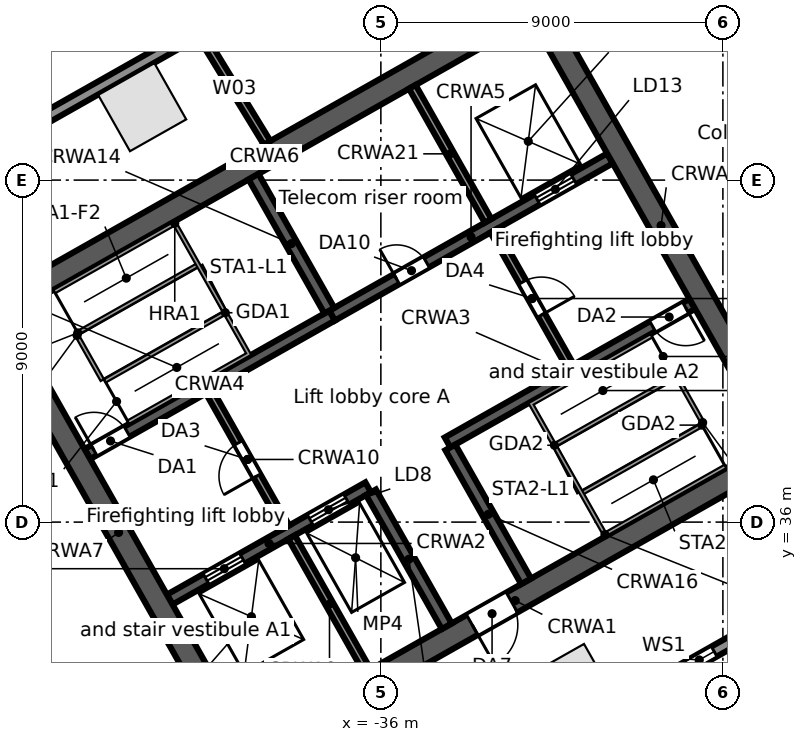
"""IFC4 building model, lengths in metres.
Left out: names, types, materials, properties, quantities, classifications, styles, units other than length and angle.
Written with IfcOpenShell. Run it as: python <this file> out.ifc"""

import sys

from ifc_helpers import new_model, si_unit, direction, frame, frame_2d, origin, origin_2d, place, context, subcontext, project, spatial, rectangle, extrude, element, fill, save


model = new_model("IFC4")
c1 = context("Model", 3, precision=1e-05, world=origin(), true_north=direction((0.0, 1.0)))
c2 = subcontext(c1, "Body", "Model", "MODEL_VIEW")
j1 = project(units=[si_unit("LENGTHUNIT", "METRE"), si_unit("PLANEANGLEUNIT", "RADIAN")], contexts=[c1])
p1 = place(None, origin())
s1 = spatial("IfcSite", under=j1, at=p1, CompositionType="ELEMENT")
p2 = place(p1, origin())
s2 = spatial("IfcBuilding", under=s1, at=p2, CompositionType="ELEMENT")
p3 = place(p2, frame((0.0, 0.0, 66.5)))
s3 = spatial("IfcBuildingStorey", under=s2, at=p3, CompositionType="ELEMENT", Elevation=66.5)
for number, where, z_axis, x_axis in (
    (1, (-42.28, 46.919, 0.0), (0.0, 0.0, 1.0), (-0.87, -0.492, 0.0)),
    (2, (-30.976, 31.635, 0.0), (0.0, 0.0, 1.0), (0.87, 0.492, 0.0)),
):
    element("IfcColumn", number, at=place(p3, frame(where, z_axis=z_axis, x_axis=x_axis)), inside=s3, PredefinedType="COLUMN", context=c2, shape_type="SweptSolid", body=[
        extrude(rectangle(XDim=1.7, YDim=1.7, at=origin_2d()), origin(), (0.0, 0.0, 1.0), 5.0),
    ])
p4 = place(p3, frame((-58.745, 38.764, 0.0), z_axis=(0.0, 0.0, 1.0), x_axis=(0.870355811726, 0.492423355453, 0.0)))
e3 = element("IfcWall", 3, at=p4, inside=s3, PredefinedType="STANDARD", context=c2, shape_type="SweptSolid", body=[
    extrude(rectangle(XDim=64.025, YDim=0.3, at=frame_2d((32.013, 0.0))), origin(), (0.0, 0.0, 1.0), 4.68),
])
p5 = place(p4, frame((60.122, 0.0, 0.6)))
e4 = element("IfcOpeningElement", 4, at=p5, cuts=e3, PredefinedType="OPENING", context=c2, shape_type="SweptSolid", body=[
    extrude(rectangle(XDim=0.9, YDim=3.2, at=frame_2d((0.45, 1.6))), frame((0.0, 0.16, 0.0), z_axis=(0.0, -1.0, 0.0), x_axis=(1.0, 0.0, 0.0)), (0.0, 0.0, 1.0), 0.32),
])
p6 = place(p4, frame((50.992, 0.0, 0.6)))
e5 = element("IfcOpeningElement", 5, at=p6, cuts=e3, PredefinedType="OPENING", context=c2, shape_type="SweptSolid", body=[
    extrude(rectangle(XDim=0.9, YDim=3.2, at=frame_2d((0.45, 1.6))), frame((0.0, 0.16, 0.0), z_axis=(0.0, -1.0, 0.0), x_axis=(1.0, 0.0, 0.0)), (0.0, 0.0, 1.0), 0.32),
])
p7 = place(p4, frame((41.862, 0.0, 0.6)))
e6 = element("IfcOpeningElement", 6, at=p7, cuts=e3, PredefinedType="OPENING", context=c2, shape_type="SweptSolid", body=[
    extrude(rectangle(XDim=0.9, YDim=3.2, at=frame_2d((0.45, 1.6))), frame((0.0, 0.16, 0.0), z_axis=(0.0, -1.0, 0.0), x_axis=(1.0, 0.0, 0.0)), (0.0, 0.0, 1.0), 0.32),
])
p8 = place(p4, frame((32.732, 0.0, 0.6)))
e7 = element("IfcOpeningElement", 7, at=p8, cuts=e3, PredefinedType="OPENING", context=c2, shape_type="SweptSolid", body=[
    extrude(rectangle(XDim=0.9, YDim=3.2, at=frame_2d((0.45, 1.6))), frame((0.0, 0.16, 0.0), z_axis=(0.0, -1.0, 0.0), x_axis=(1.0, 0.0, 0.0)), (0.0, 0.0, 1.0), 0.32),
])
p9 = place(p4, frame((23.602, 0.0, 0.6)))
e8 = element("IfcOpeningElement", 8, at=p9, cuts=e3, PredefinedType="OPENING", context=c2, shape_type="SweptSolid", body=[
    extrude(rectangle(XDim=0.9, YDim=3.2, at=frame_2d((0.45, 1.6))), frame((0.0, 0.16, 0.0), z_axis=(0.0, -1.0, 0.0), x_axis=(1.0, 0.0, 0.0)), (0.0, 0.0, 1.0), 0.32),
])
p10 = place(p4, frame((14.472, 0.0, 0.6)))
e9 = element("IfcOpeningElement", 9, at=p10, cuts=e3, PredefinedType="OPENING", context=c2, shape_type="SweptSolid", body=[
    extrude(rectangle(XDim=0.9, YDim=3.2, at=frame_2d((0.45, 1.6))), frame((0.0, 0.16, 0.0), z_axis=(0.0, -1.0, 0.0), x_axis=(1.0, 0.0, 0.0)), (0.0, 0.0, 1.0), 0.32),
])
p11 = place(p4, frame((5.342, 0.0, 0.6)))
e10 = element("IfcOpeningElement", 10, at=p11, cuts=e3, PredefinedType="OPENING", context=c2, shape_type="SweptSolid", body=[
    extrude(rectangle(XDim=0.9, YDim=3.2, at=frame_2d((0.45, 1.6))), frame((0.0, 0.16, 0.0), z_axis=(0.0, -1.0, 0.0), x_axis=(1.0, 0.0, 0.0)), (0.0, 0.0, 1.0), 0.32),
])
p12 = place(p3, frame((-44.109, 26.504, 0.0), z_axis=(0.0, 0.0, 1.0), x_axis=(-0.857169502585, 0.515034410344, 0.0)))
e11 = element("IfcWall", 11, at=p12, inside=s3, PredefinedType="STANDARD", context=c2, shape_type="SweptSolid", body=[
    extrude(rectangle(XDim=17.127, YDim=0.3, at=frame_2d((8.563, 0.0))), origin(), (0.0, 0.0, 1.0), 4.68),
])
p13 = place(p12, frame((13.403, 0.0, 0.6)))
e12 = element("IfcOpeningElement", 12, at=p13, cuts=e11, PredefinedType="OPENING", context=c2, shape_type="SweptSolid", body=[
    extrude(rectangle(XDim=0.9, YDim=3.2, at=frame_2d((0.45, 1.6))), frame((0.0, 0.16, 0.0), z_axis=(0.0, -1.0, 0.0), x_axis=(1.0, 0.0, 0.0)), (0.0, 0.0, 1.0), 0.32),
])
p14 = place(p12, frame((4.903, 0.0, 0.6)))
e13 = element("IfcOpeningElement", 13, at=p14, cuts=e11, PredefinedType="OPENING", context=c2, shape_type="SweptSolid", body=[
    extrude(rectangle(XDim=0.9, YDim=3.2, at=frame_2d((0.45, 1.6))), frame((0.0, 0.16, 0.0), z_axis=(0.0, -1.0, 0.0), x_axis=(1.0, 0.0, 0.0)), (0.0, 0.0, 1.0), 0.32),
])
p15 = place(p3, frame((-0.055, 47.969, 0.0), z_axis=(0.0, 0.0, 1.0), x_axis=(-0.870355730478, -0.492423499058, 0.0)))
e14 = element("IfcWall", 14, at=p15, inside=s3, PredefinedType="STANDARD", context=c2, shape_type="SweptSolid", body=[
    extrude(rectangle(XDim=43.75, YDim=0.3, at=frame_2d((21.875, 0.0))), origin(), (0.0, 0.0, 1.0), 4.68),
])
p16 = place(p15, frame((39.977, 0.0, 0.6)))
e15 = element("IfcOpeningElement", 15, at=p16, cuts=e14, PredefinedType="OPENING", context=c2, shape_type="SweptSolid", body=[
    extrude(rectangle(XDim=0.9, YDim=3.2, at=frame_2d((0.45, 1.6))), frame((0.0, 0.16, 0.0), z_axis=(0.0, -1.0, 0.0), x_axis=(1.0, 0.0, 0.0)), (0.0, 0.0, 1.0), 0.32),
])
p17 = place(p15, frame((31.222, 0.0, 0.6)))
e16 = element("IfcOpeningElement", 16, at=p17, cuts=e14, PredefinedType="OPENING", context=c2, shape_type="SweptSolid", body=[
    extrude(rectangle(XDim=0.9, YDim=3.2, at=frame_2d((0.45, 1.6))), frame((0.0, 0.16, 0.0), z_axis=(0.0, -1.0, 0.0), x_axis=(1.0, 0.0, 0.0)), (0.0, 0.0, 1.0), 0.32),
])
p18 = place(p15, frame((22.468, 0.0, 0.6)))
e17 = element("IfcOpeningElement", 17, at=p18, cuts=e14, PredefinedType="OPENING", context=c2, shape_type="SweptSolid", body=[
    extrude(rectangle(XDim=0.9, YDim=3.2, at=frame_2d((0.45, 1.6))), frame((0.0, 0.16, 0.0), z_axis=(0.0, -1.0, 0.0), x_axis=(1.0, 0.0, 0.0)), (0.0, 0.0, 1.0), 0.32),
])
p19 = place(p15, frame((13.713, 0.0, 0.6)))
e18 = element("IfcOpeningElement", 18, at=p19, cuts=e14, PredefinedType="OPENING", context=c2, shape_type="SweptSolid", body=[
    extrude(rectangle(XDim=0.9, YDim=3.2, at=frame_2d((0.45, 1.6))), frame((0.0, 0.16, 0.0), z_axis=(0.0, -1.0, 0.0), x_axis=(1.0, 0.0, 0.0)), (0.0, 0.0, 1.0), 0.32),
])
p20 = place(p15, frame((4.959, 0.0, 0.6)))
e19 = element("IfcOpeningElement", 19, at=p20, cuts=e14, PredefinedType="OPENING", context=c2, shape_type="SweptSolid", body=[
    extrude(rectangle(XDim=0.9, YDim=3.2, at=frame_2d((0.45, 1.6))), frame((0.0, 0.16, 0.0), z_axis=(0.0, -1.0, 0.0), x_axis=(1.0, 0.0, 0.0)), (0.0, 0.0, 1.0), 0.32),
])
p21 = place(p3, frame((-39.862, 29.749, 0.0), z_axis=(0.0, 0.0, 1.0), x_axis=(0.870350116061, 0.492433422375, 0.0)))
e20 = element("IfcWall", 20, at=p21, inside=s3, PredefinedType="SOLIDWALL", context=c2, shape_type="SweptSolid", body=[
    extrude(rectangle(XDim=17.0, YDim=0.6, at=frame_2d((8.5, 0.0))), origin(), (0.0, 0.0, 1.0), 4.68),
])
p22 = place(p21, frame((7.2, 0.0, 0.0)))
e21 = element("IfcOpeningElement", 21, at=p22, cuts=e20, PredefinedType="OPENING", context=c2, shape_type="SweptSolid", body=[
    extrude(rectangle(XDim=1.2, YDim=2.1, at=frame_2d((0.6, 1.05))), frame((0.0, 0.31, 0.0), z_axis=(0.0, -1.0, 0.0), x_axis=(1.0, 0.0, 0.0)), (0.0, 0.0, 1.0), 0.62),
])
p23 = place(p3, frame((-41.556, 33.961, 0.0), z_axis=(0.0, 0.0, 1.0), x_axis=(0.870343731308, 0.492444706919, 0.0)))
e22 = element("IfcWall", 22, at=p23, inside=s3, PredefinedType="SOLIDWALL", context=c2, shape_type="SweptSolid", body=[
    extrude(rectangle(XDim=6.0, YDim=0.3, at=frame_2d((3.0, 0.0))), origin(), (0.0, 0.0, 1.0), 4.68),
])
p24 = place(p23, frame((1.1, 0.0, 0.0)))
e23 = element("IfcOpeningElement", 23, at=p24, cuts=e22, PredefinedType="OPENING", context=c2, shape_type="SweptSolid", body=[
    extrude(rectangle(XDim=1.1, YDim=2.1, at=frame_2d((0.55, 1.05))), frame((0.0, 0.16, 0.0), z_axis=(0.0, -1.0, 0.0), x_axis=(1.0, 0.0, 0.0)), (0.0, 0.0, 1.0), 0.32),
])
p25 = place(p23, frame((4.25, 0.0, 0.0)))
e24 = element("IfcOpeningElement", 24, at=p25, cuts=e22, PredefinedType="OPENING", context=c2, shape_type="SweptSolid", body=[
    extrude(rectangle(XDim=1.1, YDim=2.1, at=frame_2d((0.55, 1.05))), frame((0.0, 0.16, 0.0), z_axis=(0.0, -1.0, 0.0), x_axis=(1.0, 0.0, 0.0)), (0.0, 0.0, 1.0), 0.32),
])
p26 = place(p3, frame((-34.245, 38.097, 0.0), z_axis=(0.0, 0.0, 1.0), x_axis=(0.870364910201, 0.492407273597, 0.0)))
e25 = element("IfcWall", 25, at=p26, inside=s3, PredefinedType="SOLIDWALL", context=c2, shape_type="SweptSolid", body=[
    extrude(rectangle(XDim=7.4, YDim=0.3, at=frame_2d((3.7, 0.0))), origin(), (0.0, 0.0, 1.0), 4.68),
])
p27 = place(p26, frame((6.2, 0.0, 0.0)))
e26 = element("IfcOpeningElement", 26, at=p27, cuts=e25, PredefinedType="OPENING", context=c2, shape_type="SweptSolid", body=[
    extrude(rectangle(XDim=1.0, YDim=2.1, at=frame_2d((0.5, 1.05))), frame((0.0, 0.16, 0.0), z_axis=(0.0, -1.0, 0.0), x_axis=(1.0, 0.0, 0.0)), (0.0, 0.0, 1.0), 0.32),
])
p28 = place(p3, frame((-43.723, 37.791, 0.0), z_axis=(0.0, 0.0, 1.0), x_axis=(0.87035077051, 0.49243226567, 0.0)))
e27 = element("IfcWall", 27, at=p28, inside=s3, PredefinedType="SOLIDWALL", context=c2, shape_type="SweptSolid", body=[
    extrude(rectangle(XDim=7.4, YDim=0.3, at=frame_2d((3.7, 0.0))), origin(), (0.0, 0.0, 1.0), 4.68),
])
p29 = place(p28, frame((0.2, 0.0, 0.0)))
e28 = element("IfcOpeningElement", 28, at=p29, cuts=e27, PredefinedType="OPENING", context=c2, shape_type="SweptSolid", body=[
    extrude(rectangle(XDim=1.0, YDim=2.1, at=frame_2d((0.5, 1.05))), frame((0.0, 0.16, 0.0), z_axis=(0.0, -1.0, 0.0), x_axis=(1.0, 0.0, 0.0)), (0.0, 0.0, 1.0), 0.32),
])
p30 = place(p3, frame((-37.282, 41.435, 0.0), z_axis=(0.0, 0.0, 1.0), x_axis=(0.870356516133, 0.492422110414, 0.0)))
e29 = element("IfcWall", 29, at=p30, inside=s3, PredefinedType="SOLIDWALL", context=c2, shape_type="SweptSolid", body=[
    extrude(rectangle(XDim=8.4, YDim=0.3, at=frame_2d((4.2, 0.0))), origin(), (0.0, 0.0, 1.0), 4.68),
])
p31 = place(p30, frame((6.2, 0.0, 0.0)))
e30 = element("IfcOpeningElement", 30, at=p31, cuts=e29, PredefinedType="OPENING", context=c2, shape_type="SweptSolid", body=[
    extrude(rectangle(XDim=1.1, YDim=2.1, at=frame_2d((0.55, 1.05))), frame((0.0, 0.16, 0.0), z_axis=(0.0, -1.0, 0.0), x_axis=(1.0, 0.0, 0.0)), (0.0, 0.0, 1.0), 0.32),
])
p32 = place(p30, frame((1.95, 0.0, 0.0)))
e31 = element("IfcOpeningElement", 31, at=p32, cuts=e29, PredefinedType="OPENING", context=c2, shape_type="SweptSolid", body=[
    extrude(rectangle(XDim=0.9, YDim=2.1, at=frame_2d((0.45, 1.05))), frame((0.0, 0.16, 0.0), z_axis=(0.0, -1.0, 0.0), x_axis=(1.0, 0.0, 0.0)), (0.0, 0.0, 1.0), 0.32),
])
p33 = place(p3, frame((-46.461, 41.412, 0.0), z_axis=(0.0, 0.0, 1.0), x_axis=(0.870350116061, 0.492433422375, 0.0)))
e32 = element("IfcWall", 32, at=p33, inside=s3, PredefinedType="SOLIDWALL", context=c2, shape_type="SweptSolid", body=[
    extrude(rectangle(XDim=17.0, YDim=0.6, at=frame_2d((8.5, 0.0))), origin(), (0.0, 0.0, 1.0), 4.68),
])
p34 = place(p3, frame((-46.052, 41.298, 0.0), z_axis=(0.0, 0.0, 1.0), x_axis=(0.492418598281, -0.870358503186, 0.0)))
e33 = element("IfcWall", 33, at=p34, inside=s3, PredefinedType="SOLIDWALL", context=c2, shape_type="SweptSolid", body=[
    extrude(rectangle(XDim=12.8, YDim=0.6, at=frame_2d((6.4, 0.0))), origin(), (0.0, 0.0, 1.0), 4.68),
])
p35 = place(p3, frame((-38.349, 35.603, 0.0), z_axis=(0.0, 0.0, 1.0), x_axis=(0.49241474071, -0.870360685654, 0.0)))
e34 = element("IfcWall", 34, at=p35, inside=s3, PredefinedType="SOLIDWALL", context=c2, shape_type="SweptSolid", body=[
    extrude(rectangle(XDim=4.05, YDim=0.2, at=frame_2d((2.025, 0.0))), origin(), (0.0, 0.0, 1.0), 4.68),
])
p36 = place(p3, frame((-40.516, 39.433, 0.0), z_axis=(0.0, 0.0, 1.0), x_axis=(0.492453559952, -0.87033872216, 0.0)))
e35 = element("IfcWall", 35, at=p36, inside=s3, PredefinedType="PARTITIONING", context=c2, shape_type="SweptSolid", body=[
    extrude(rectangle(XDim=4.1, YDim=0.2, at=frame_2d((2.05, 0.0))), origin(), (0.0, 0.0, 1.0), 4.68),
])
p37 = place(p36, frame((1.55, 0.0, 0.0)))
e36 = element("IfcOpeningElement", 36, at=p37, cuts=e35, PredefinedType="OPENING", context=c2, shape_type="SweptSolid", body=[
    extrude(rectangle(XDim=1.0, YDim=2.1, at=frame_2d((0.5, 1.05))), frame((0.0, 0.11, 0.0), z_axis=(0.0, -1.0, 0.0), x_axis=(1.0, 0.0, 0.0)), (0.0, 0.0, 1.0), 0.22),
])
p38 = place(p3, frame((-36.26, 36.785, 0.0), z_axis=(0.0, 0.0, 1.0), x_axis=(0.492440575896, -0.870346068648, 0.0)))
e37 = element("IfcWall", 37, at=p38, inside=s3, PredefinedType="SOLIDWALL", context=c2, shape_type="SweptSolid", body=[
    extrude(rectangle(XDim=4.05, YDim=0.3, at=frame_2d((2.025, 0.0))), origin(), (0.0, 0.0, 1.0), 4.68),
])
p39 = place(p3, frame((-39.35, 45.09, 0.0), z_axis=(0.0, 0.0, 1.0), x_axis=(0.49241474071, -0.870360685654, 0.0)))
e38 = element("IfcWall", 38, at=p39, inside=s3, PredefinedType="SOLIDWALL", context=c2, shape_type="SweptSolid", body=[
    extrude(rectangle(XDim=4.05, YDim=0.3, at=frame_2d((2.025, 0.0))), origin(), (0.0, 0.0, 1.0), 4.68),
])
p40 = place(p3, frame((-34.171, 37.967, 0.0), z_axis=(0.0, 0.0, 1.0), x_axis=(0.492394910396, -0.870371904542, 0.0)))
e39 = element("IfcWall", 39, at=p40, inside=s3, PredefinedType="SOLIDWALL", context=c2, shape_type="SweptSolid", body=[
    extrude(rectangle(XDim=4.05, YDim=0.3, at=frame_2d((2.025, 0.0))), origin(), (0.0, 0.0, 1.0), 4.68),
])
p41 = place(p3, frame((-33.031, 43.667, 0.0), z_axis=(0.0, 0.0, 1.0), x_axis=(0.492408451753, -0.87036424366, 0.0)))
e40 = element("IfcWall", 40, at=p41, inside=s3, PredefinedType="PARTITIONING", context=c2, shape_type="SweptSolid", body=[
    extrude(rectangle(XDim=4.1, YDim=0.2, at=frame_2d((2.05, 0.0))), origin(), (0.0, 0.0, 1.0), 4.68),
])
p42 = place(p41, frame((1.55, 0.0, 0.0)))
e41 = element("IfcOpeningElement", 41, at=p42, cuts=e40, PredefinedType="OPENING", context=c2, shape_type="SweptSolid", body=[
    extrude(rectangle(XDim=1.0, YDim=2.1, at=frame_2d((0.5, 1.05))), frame((0.0, 0.11, 0.0), z_axis=(0.0, -1.0, 0.0), x_axis=(1.0, 0.0, 0.0)), (0.0, 0.0, 1.0), 0.22),
])
p43 = place(p3, frame((-35.173, 47.454, 0.0), z_axis=(0.0, 0.0, 1.0), x_axis=(0.492440575896, -0.870346068648, 0.0)))
e42 = element("IfcWall", 42, at=p43, inside=s3, PredefinedType="SOLIDWALL", context=c2, shape_type="SweptSolid", body=[
    extrude(rectangle(XDim=4.05, YDim=0.2, at=frame_2d((2.025, 0.0))), origin(), (0.0, 0.0, 1.0), 4.68),
])
p44 = place(p3, frame((-31.778, 49.374, 0.0), z_axis=(0.0, 0.0, 1.0), x_axis=(0.492433046652, -0.870350328641, 0.0)))
e43 = element("IfcWall", 43, at=p44, inside=s3, PredefinedType="SOLIDWALL", context=c2, shape_type="SweptSolid", body=[
    extrude(rectangle(XDim=12.8, YDim=0.6, at=frame_2d((6.4, 0.0))), origin(), (0.0, 0.0, 1.0), 4.68),
])
p45 = place(p3, frame((-40.713, 48.794, 0.0), z_axis=(0.0, 0.0, 1.0), x_axis=(0.52165366254, -0.853157345604, 0.0)))
e44 = element("IfcWall", 44, at=p45, inside=s3, PredefinedType="PARTITIONING", context=c2, shape_type="SweptSolid", body=[
    extrude(rectangle(XDim=3.297, YDim=0.2, at=frame_2d((1.648, 0.0))), origin(), (0.0, 0.0, 1.0), 3.96),
])
p46 = place(p17, origin())
e45 = element("IfcWindow", 45, at=p46, inside=s3, PartitioningType="SINGLE_PANEL", PredefinedType="WINDOW", context=c2, shape_type="SweptSolid", body=[
    extrude(rectangle(XDim=0.9, YDim=3.2, at=frame_2d((0.45, 1.6))), frame((0.0, 0.03, 0.0), z_axis=(0.0, -1.0, 0.0), x_axis=(1.0, 0.0, 0.0)), (0.0, 0.0, 1.0), 0.06),
])
fill(e16, e45)
p47 = place(p31, origin())
e46 = element("IfcDoor", 46, at=p47, inside=s3, OperationType="DOUBLE_DOOR_SLIDING", PredefinedType="DOOR", context=c2, shape_type="SweptSolid", body=[
    extrude(rectangle(XDim=1.1, YDim=2.1, at=frame_2d((0.55, 1.05))), frame((0.0, 0.025, 0.0), z_axis=(0.0, -1.0, 0.0), x_axis=(1.0, 0.0, 0.0)), (0.0, 0.0, 1.0), 0.05),
])
fill(e30, e46)
p48 = place(p24, origin())
e47 = element("IfcDoor", 47, at=p48, inside=s3, OperationType="DOUBLE_DOOR_SLIDING", PredefinedType="DOOR", context=c2, shape_type="SweptSolid", body=[
    extrude(rectangle(XDim=1.1, YDim=2.1, at=frame_2d((0.55, 1.05))), frame((0.0, 0.025, 0.0), z_axis=(0.0, -1.0, 0.0), x_axis=(1.0, 0.0, 0.0)), (0.0, 0.0, 1.0), 0.05),
])
fill(e23, e47)
p49 = place(p25, origin())
e48 = element("IfcDoor", 48, at=p49, inside=s3, OperationType="DOUBLE_DOOR_SLIDING", PredefinedType="DOOR", context=c2, shape_type="SweptSolid", body=[
    extrude(rectangle(XDim=1.1, YDim=2.1, at=frame_2d((0.55, 1.05))), frame((0.0, 0.025, 0.0), z_axis=(0.0, -1.0, 0.0), x_axis=(1.0, 0.0, 0.0)), (0.0, 0.0, 1.0), 0.05),
])
fill(e24, e48)
p50 = place(p29, origin())
e49 = element("IfcDoor", 49, at=p50, inside=s3, OperationType="SINGLE_SWING_LEFT", PredefinedType="DOOR", context=c2, shape_type="SweptSolid", body=[
    extrude(rectangle(XDim=1.0, YDim=2.1, at=frame_2d((0.5, 1.05))), frame((0.0, 0.025, 0.0), z_axis=(0.0, -1.0, 0.0), x_axis=(1.0, 0.0, 0.0)), (0.0, 0.0, 1.0), 0.05),
])
fill(e28, e49)
p51 = place(p27, frame((1.0, 0.0, 0.0), z_axis=(0.0, 0.0, 1.0), x_axis=(-1.0, 0.0, 0.0)))
e50 = element("IfcDoor", 50, at=p51, inside=s3, OperationType="SINGLE_SWING_LEFT", PredefinedType="DOOR", context=c2, shape_type="SweptSolid", body=[
    extrude(rectangle(XDim=1.0, YDim=2.1, at=frame_2d((0.5, 1.05))), frame((0.0, 0.025, 0.0), z_axis=(0.0, -1.0, 0.0), x_axis=(1.0, 0.0, 0.0)), (0.0, 0.0, 1.0), 0.05),
])
fill(e26, e50)
p52 = place(p37, frame((1.0, 0.0, 0.0), z_axis=(0.0, 0.0, 1.0), x_axis=(-1.0, 0.0, 0.0)))
e51 = element("IfcDoor", 51, at=p52, inside=s3, OperationType="SINGLE_SWING_LEFT", PredefinedType="DOOR", context=c2, shape_type="SweptSolid", body=[
    extrude(rectangle(XDim=1.0, YDim=2.1, at=frame_2d((0.5, 1.05))), frame((0.0, 0.025, 0.0), z_axis=(0.0, -1.0, 0.0), x_axis=(1.0, 0.0, 0.0)), (0.0, 0.0, 1.0), 0.05),
])
fill(e36, e51)
p53 = place(p42, origin())
e52 = element("IfcDoor", 52, at=p53, inside=s3, OperationType="SINGLE_SWING_RIGHT", PredefinedType="DOOR", context=c2, shape_type="SweptSolid", body=[
    extrude(rectangle(XDim=1.0, YDim=2.1, at=frame_2d((0.5, 1.05))), frame((0.0, 0.025, 0.0), z_axis=(0.0, -1.0, 0.0), x_axis=(1.0, 0.0, 0.0)), (0.0, 0.0, 1.0), 0.05),
])
fill(e41, e52)
p54 = place(p22, frame((1.2, 0.0, 0.0), z_axis=(0.0, 0.0, 1.0), x_axis=(-1.0, 0.0, 0.0)))
e53 = element("IfcDoor", 53, at=p54, inside=s3, OperationType="SINGLE_SWING_RIGHT", PredefinedType="DOOR", context=c2, shape_type="SweptSolid", body=[
    extrude(rectangle(XDim=1.2, YDim=2.1, at=frame_2d((0.6, 1.05))), frame((0.0, 0.025, 0.0), z_axis=(0.0, -1.0, 0.0), x_axis=(1.0, 0.0, 0.0)), (0.0, 0.0, 1.0), 0.05),
])
fill(e21, e53)
p55 = place(p32, origin())
e54 = element("IfcDoor", 54, at=p55, inside=s3, OperationType="SINGLE_SWING_LEFT", PredefinedType="DOOR", context=c2, shape_type="SweptSolid", body=[
    extrude(rectangle(XDim=0.9, YDim=2.1, at=frame_2d((0.45, 1.05))), frame((0.0, 0.025, 0.0), z_axis=(0.0, -1.0, 0.0), x_axis=(1.0, 0.0, 0.0)), (0.0, 0.0, 1.0), 0.05),
])
fill(e31, e54)
save(model, sys.argv[1])
